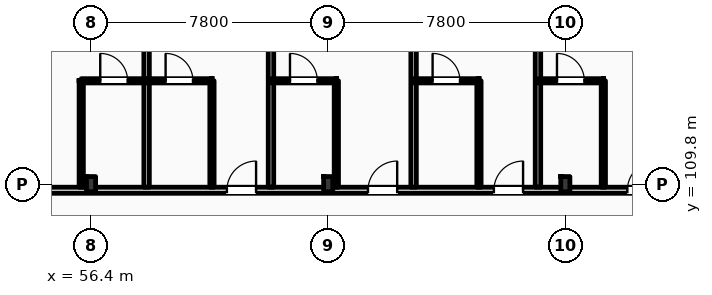
"""IFC4 building model, lengths in metres.
Left out: names, types, materials, properties, quantities, classifications, styles, units other than length and angle.
Written with IfcOpenShell. Run it as: python <this file> out.ifc"""

import sys

from ifc_helpers import new_model, si_unit, direction, frame, frame_2d, origin, origin_2d, place, context, subcontext, project, spatial, rectangle, i_section, extrude, element, fill, save


model = new_model("IFC4")
c1 = context("Model", 3, precision=1e-05, world=origin(), true_north=direction((0.0, 1.0)))
c2 = subcontext(c1, "Body", "Model", "MODEL_VIEW")
j1 = project(units=[si_unit("LENGTHUNIT", "METRE"), si_unit("PLANEANGLEUNIT", "RADIAN")], contexts=[c1])
p1 = place(None, origin())
s1 = spatial("IfcSite", under=j1, at=p1, CompositionType="ELEMENT")
p2 = place(p1, origin())
s2 = spatial("IfcBuilding", under=s1, at=p2, CompositionType="ELEMENT")
p3 = place(p2, frame((0.0, 0.0, 28.2)))
s3 = spatial("IfcBuildingStorey", under=s2, at=p3, CompositionType="ELEMENT", Elevation=28.2)
for number, where, z_axis, x_axis in (
    (1, (56.4, 109.8, 0.0), (0.0, 0.0, 1.0), (1.0, 0.0, 0.0)),
    (2, (64.2, 109.8, 0.0), (0.0, 0.0, 1.0), (1.0, 0.0, 0.0)),
    (3, (72.0, 109.8, 0.0), (0.0, 0.0, 1.0), (1.0, 0.0, 0.0)),
):
    element("IfcColumn", number, at=place(p3, frame(where, z_axis=z_axis, x_axis=x_axis)), inside=s3, PredefinedType="COLUMN", context=c2, shape_type="SweptSolid", body=[
        extrude(i_section(OverallWidth=0.3, OverallDepth=0.5, WebThickness=0.014, FlangeThickness=0.028, FilletRadius=0.027, at=origin_2d()), origin(), (0.0, 0.0, 1.0), 3.6),
    ])
p4 = place(p3, frame((10.65, 109.6, 0.0), z_axis=(0.0, 0.0, 1.0), x_axis=(1.0, 0.0, 0.0)))
e4 = element("IfcWall", 4, at=p4, inside=s3, PredefinedType="PARTITIONING", context=c2, shape_type="SweptSolid", body=[
    extrude(rectangle(XDim=109.21, YDim=0.2, at=frame_2d((54.605, 0.0))), origin(), (0.0, 0.0, 1.0), 2.8),
])
p5 = place(p4, frame((12.611, 0.0, 0.0)))
e5 = element("IfcOpeningElement", 5, at=p5, cuts=e4, PredefinedType="OPENING", context=c2, shape_type="SweptSolid", body=[
    extrude(rectangle(XDim=1.02, YDim=2.2, at=frame_2d((0.51, 1.1))), frame((0.0, 0.11, 0.0), z_axis=(0.0, -1.0, 0.0), x_axis=(1.0, 0.0, 0.0)), (0.0, 0.0, 1.0), 0.22),
])
p6 = place(p4, frame((19.451, 0.0, 0.0)))
e6 = element("IfcOpeningElement", 6, at=p6, cuts=e4, PredefinedType="OPENING", context=c2, shape_type="SweptSolid", body=[
    extrude(rectangle(XDim=1.02, YDim=2.2, at=frame_2d((0.51, 1.1))), frame((0.0, 0.11, 0.0), z_axis=(0.0, -1.0, 0.0), x_axis=(1.0, 0.0, 0.0)), (0.0, 0.0, 1.0), 0.22),
])
p7 = place(p4, frame((23.842, 0.0, 0.0)))
e7 = element("IfcOpeningElement", 7, at=p7, cuts=e4, PredefinedType="OPENING", context=c2, shape_type="SweptSolid", body=[
    extrude(rectangle(XDim=1.02, YDim=2.2, at=frame_2d((0.51, 1.1))), frame((0.0, 0.11, 0.0), z_axis=(0.0, -1.0, 0.0), x_axis=(1.0, 0.0, 0.0)), (0.0, 0.0, 1.0), 0.22),
])
p8 = place(p4, frame((26.084, 0.0, 0.0)))
e8 = element("IfcOpeningElement", 8, at=p8, cuts=e4, PredefinedType="OPENING", context=c2, shape_type="SweptSolid", body=[
    extrude(rectangle(XDim=1.02, YDim=2.2, at=frame_2d((0.51, 1.1))), frame((0.0, 0.11, 0.0), z_axis=(0.0, -1.0, 0.0), x_axis=(1.0, 0.0, 0.0)), (0.0, 0.0, 1.0), 0.22),
])
p9 = place(p4, frame((32.655, 0.0, 0.0)))
e9 = element("IfcOpeningElement", 9, at=p9, cuts=e4, PredefinedType="OPENING", context=c2, shape_type="SweptSolid", body=[
    extrude(rectangle(XDim=0.96, YDim=2.2, at=frame_2d((0.48, 1.1))), frame((0.0, 0.11, 0.0), z_axis=(0.0, -1.0, 0.0), x_axis=(1.0, 0.0, 0.0)), (0.0, 0.0, 1.0), 0.22),
])
p10 = place(p4, frame((34.895, 0.0, 0.0)))
e10 = element("IfcOpeningElement", 10, at=p10, cuts=e4, PredefinedType="OPENING", context=c2, shape_type="SweptSolid", body=[
    extrude(rectangle(XDim=0.96, YDim=2.2, at=frame_2d((0.48, 1.1))), frame((0.0, 0.11, 0.0), z_axis=(0.0, -1.0, 0.0), x_axis=(1.0, 0.0, 0.0)), (0.0, 0.0, 1.0), 0.22),
])
p11 = place(p4, frame((41.436, 0.0, 0.0)))
e11 = element("IfcOpeningElement", 11, at=p11, cuts=e4, PredefinedType="OPENING", context=c2, shape_type="SweptSolid", body=[
    extrude(rectangle(XDim=0.96, YDim=2.2, at=frame_2d((0.48, 1.1))), frame((0.0, 0.11, 0.0), z_axis=(0.0, -1.0, 0.0), x_axis=(1.0, 0.0, 0.0)), (0.0, 0.0, 1.0), 0.22),
])
p12 = place(p4, frame((43.427, 0.0, 0.0)))
e12 = element("IfcOpeningElement", 12, at=p12, cuts=e4, PredefinedType="OPENING", context=c2, shape_type="SweptSolid", body=[
    extrude(rectangle(XDim=0.96, YDim=2.2, at=frame_2d((0.48, 1.1))), frame((0.0, 0.11, 0.0), z_axis=(0.0, -1.0, 0.0), x_axis=(1.0, 0.0, 0.0)), (0.0, 0.0, 1.0), 0.22),
])
p13 = place(p4, frame((50.218, 0.0, 0.0)))
e13 = element("IfcOpeningElement", 13, at=p13, cuts=e4, PredefinedType="OPENING", context=c2, shape_type="SweptSolid", body=[
    extrude(rectangle(XDim=0.96, YDim=2.2, at=frame_2d((0.48, 1.1))), frame((0.0, 0.11, 0.0), z_axis=(0.0, -1.0, 0.0), x_axis=(1.0, 0.0, 0.0)), (0.0, 0.0, 1.0), 0.22),
])
p14 = place(p4, frame((54.859, 0.0, 0.0)))
e14 = element("IfcOpeningElement", 14, at=p14, cuts=e4, PredefinedType="OPENING", context=c2, shape_type="SweptSolid", body=[
    extrude(rectangle(XDim=0.96, YDim=2.2, at=frame_2d((0.48, 1.1))), frame((0.0, 0.11, 0.0), z_axis=(0.0, -1.0, 0.0), x_axis=(1.0, 0.0, 0.0)), (0.0, 0.0, 1.0), 0.22),
])
p15 = place(p4, frame((59.0, 0.0, 0.0)))
e15 = element("IfcOpeningElement", 15, at=p15, cuts=e4, PredefinedType="OPENING", context=c2, shape_type="SweptSolid", body=[
    extrude(rectangle(XDim=0.96, YDim=2.2, at=frame_2d((0.48, 1.1))), frame((0.0, 0.11, 0.0), z_axis=(0.0, -1.0, 0.0), x_axis=(1.0, 0.0, 0.0)), (0.0, 0.0, 1.0), 0.22),
])
p16 = place(p4, frame((63.39, 0.0, 0.0)))
e16 = element("IfcOpeningElement", 16, at=p16, cuts=e4, PredefinedType="OPENING", context=c2, shape_type="SweptSolid", body=[
    extrude(rectangle(XDim=0.96, YDim=2.2, at=frame_2d((0.48, 1.1))), frame((0.0, 0.11, 0.0), z_axis=(0.0, -1.0, 0.0), x_axis=(1.0, 0.0, 0.0)), (0.0, 0.0, 1.0), 0.22),
])
p17 = place(p4, frame((65.631, 0.0, 0.0)))
e17 = element("IfcOpeningElement", 17, at=p17, cuts=e4, PredefinedType="OPENING", context=c2, shape_type="SweptSolid", body=[
    extrude(rectangle(XDim=0.96, YDim=2.2, at=frame_2d((0.48, 1.1))), frame((0.0, 0.11, 0.0), z_axis=(0.0, -1.0, 0.0), x_axis=(1.0, 0.0, 0.0)), (0.0, 0.0, 1.0), 0.22),
])
p18 = place(p4, frame((72.172, 0.0, 0.0)))
e18 = element("IfcOpeningElement", 18, at=p18, cuts=e4, PredefinedType="OPENING", context=c2, shape_type="SweptSolid", body=[
    extrude(rectangle(XDim=0.96, YDim=2.2, at=frame_2d((0.48, 1.1))), frame((0.0, 0.11, 0.0), z_axis=(0.0, -1.0, 0.0), x_axis=(1.0, 0.0, 0.0)), (0.0, 0.0, 1.0), 0.22),
])
p19 = place(p4, frame((74.413, 0.0, 0.0)))
e19 = element("IfcOpeningElement", 19, at=p19, cuts=e4, PredefinedType="OPENING", context=c2, shape_type="SweptSolid", body=[
    extrude(rectangle(XDim=0.96, YDim=2.2, at=frame_2d((0.48, 1.1))), frame((0.0, 0.11, 0.0), z_axis=(0.0, -1.0, 0.0), x_axis=(1.0, 0.0, 0.0)), (0.0, 0.0, 1.0), 0.22),
])
p20 = place(p4, frame((80.954, 0.0, 0.0)))
e20 = element("IfcOpeningElement", 20, at=p20, cuts=e4, PredefinedType="OPENING", context=c2, shape_type="SweptSolid", body=[
    extrude(rectangle(XDim=0.96, YDim=2.2, at=frame_2d((0.48, 1.1))), frame((0.0, 0.11, 0.0), z_axis=(0.0, -1.0, 0.0), x_axis=(1.0, 0.0, 0.0)), (0.0, 0.0, 1.0), 0.22),
])
p21 = place(p4, frame((83.195, 0.0, 0.0)))
e21 = element("IfcOpeningElement", 21, at=p21, cuts=e4, PredefinedType="OPENING", context=c2, shape_type="SweptSolid", body=[
    extrude(rectangle(XDim=0.96, YDim=2.2, at=frame_2d((0.48, 1.1))), frame((0.0, 0.11, 0.0), z_axis=(0.0, -1.0, 0.0), x_axis=(1.0, 0.0, 0.0)), (0.0, 0.0, 1.0), 0.22),
])
p22 = place(p4, frame((89.735, 0.0, 0.0)))
e22 = element("IfcOpeningElement", 22, at=p22, cuts=e4, PredefinedType="OPENING", context=c2, shape_type="SweptSolid", body=[
    extrude(rectangle(XDim=0.96, YDim=2.2, at=frame_2d((0.48, 1.1))), frame((0.0, 0.11, 0.0), z_axis=(0.0, -1.0, 0.0), x_axis=(1.0, 0.0, 0.0)), (0.0, 0.0, 1.0), 0.22),
])
p23 = place(p4, frame((94.126, 0.0, 0.0)))
e23 = element("IfcOpeningElement", 23, at=p23, cuts=e4, PredefinedType="OPENING", context=c2, shape_type="SweptSolid", body=[
    extrude(rectangle(XDim=0.96, YDim=2.2, at=frame_2d((0.48, 1.1))), frame((0.0, 0.11, 0.0), z_axis=(0.0, -1.0, 0.0), x_axis=(1.0, 0.0, 0.0)), (0.0, 0.0, 1.0), 0.22),
])
p24 = place(p4, frame((98.517, 0.0, 0.0)))
e24 = element("IfcOpeningElement", 24, at=p24, cuts=e4, PredefinedType="OPENING", context=c2, shape_type="SweptSolid", body=[
    extrude(rectangle(XDim=0.96, YDim=2.2, at=frame_2d((0.48, 1.1))), frame((0.0, 0.11, 0.0), z_axis=(0.0, -1.0, 0.0), x_axis=(1.0, 0.0, 0.0)), (0.0, 0.0, 1.0), 0.22),
])
p25 = place(p4, frame((102.908, 0.0, 0.0)))
e25 = element("IfcOpeningElement", 25, at=p25, cuts=e4, PredefinedType="OPENING", context=c2, shape_type="SweptSolid", body=[
    extrude(rectangle(XDim=0.96, YDim=2.2, at=frame_2d((0.48, 1.1))), frame((0.0, 0.11, 0.0), z_axis=(0.0, -1.0, 0.0), x_axis=(1.0, 0.0, 0.0)), (0.0, 0.0, 1.0), 0.22),
])
p26 = place(p4, frame((105.099, 0.0, 0.0)))
e26 = element("IfcOpeningElement", 26, at=p26, cuts=e4, PredefinedType="OPENING", context=c2, shape_type="SweptSolid", body=[
    extrude(rectangle(XDim=0.96, YDim=2.2, at=frame_2d((0.48, 1.1))), frame((0.0, 0.11, 0.0), z_axis=(0.0, -1.0, 0.0), x_axis=(1.0, 0.0, 0.0)), (0.0, 0.0, 1.0), 0.22),
])
p27 = place(p4, frame((2.716, 0.0, 0.0)))
e27 = element("IfcOpeningElement", 27, at=p27, cuts=e4, PredefinedType="OPENING", context=c2, shape_type="SweptSolid", body=[
    extrude(rectangle(XDim=1.35, YDim=2.25, at=frame_2d((0.675, 1.125))), frame((0.0, 0.11, 0.0), z_axis=(0.0, -1.0, 0.0), x_axis=(1.0, 0.0, 0.0)), (0.0, 0.0, 1.0), 0.22),
])
p28 = place(p4, frame((6.65, 0.0, 0.0)))
e28 = element("IfcOpeningElement", 28, at=p28, cuts=e4, PredefinedType="OPENING", context=c2, shape_type="SweptSolid", body=[
    extrude(rectangle(XDim=1.35, YDim=2.25, at=frame_2d((0.675, 1.125))), frame((0.0, 0.11, 0.0), z_axis=(0.0, -1.0, 0.0), x_axis=(1.0, 0.0, 0.0)), (0.0, 0.0, 1.0), 0.22),
])
p29 = place(p4, frame((10.583, 0.0, 0.0)))
e29 = element("IfcOpeningElement", 29, at=p29, cuts=e4, PredefinedType="OPENING", context=c2, shape_type="SweptSolid", body=[
    extrude(rectangle(XDim=1.35, YDim=2.25, at=frame_2d((0.675, 1.125))), frame((0.0, 0.11, 0.0), z_axis=(0.0, -1.0, 0.0), x_axis=(1.0, 0.0, 0.0)), (0.0, 0.0, 1.0), 0.22),
])
p30 = place(p3, frame((58.227, 109.7, 0.0), z_axis=(0.0, 0.0, 1.0), x_axis=(0.0, 1.0, 0.0)))
e30 = element("IfcWall", 30, at=p30, inside=s3, PredefinedType="PARTITIONING", context=c2, shape_type="SweptSolid", body=[
    extrude(rectangle(XDim=8.15, YDim=0.18, at=frame_2d((4.075, 0.0))), origin(), (0.0, 0.0, 1.0), 3.36),
])
p31 = place(p3, frame((56.077, 109.7, 0.0), z_axis=(0.0, 0.0, 1.0), x_axis=(0.0, 1.0, 0.0)))
e31 = element("IfcWall", 31, at=p31, inside=s3, PredefinedType="PARTITIONING", context=c2, shape_type="SweptSolid", body=[
    extrude(rectangle(XDim=3.5, YDim=0.14, at=frame_2d((1.75, 0.0))), origin(), (0.0, 0.0, 1.0), 3.36),
])
p32 = place(p3, frame((56.077, 113.2, 0.0), z_axis=(0.0, 0.0, 1.0), x_axis=(1.0, 0.0, 0.0)))
e32 = element("IfcWall", 32, at=p32, inside=s3, PredefinedType="PARTITIONING", context=c2, shape_type="SweptSolid", body=[
    extrude(rectangle(XDim=2.15, YDim=0.14, at=frame_2d((1.075, 0.0))), origin(), (0.0, 0.0, 1.0), 3.36),
])
p33 = place(p32, frame((0.625, 0.0, 0.0)))
e33 = element("IfcOpeningElement", 33, at=p33, cuts=e32, PredefinedType="OPENING", context=c2, shape_type="SweptSolid", body=[
    extrude(rectangle(XDim=0.9, YDim=2.1, at=frame_2d((0.45, 1.05))), frame((0.0, 0.08, 0.0), z_axis=(0.0, -1.0, 0.0), x_axis=(1.0, 0.0, 0.0)), (0.0, 0.0, 1.0), 0.16),
])
p34 = place(p3, frame((62.318, 109.7, 0.0), z_axis=(0.0, 0.0, 1.0), x_axis=(0.0, 1.0, 0.0)))
e34 = element("IfcWall", 34, at=p34, inside=s3, PredefinedType="PARTITIONING", context=c2, shape_type="SweptSolid", body=[
    extrude(rectangle(XDim=8.15, YDim=0.18, at=frame_2d((4.075, 0.0))), origin(), (0.0, 0.0, 1.0), 3.36),
])
p35 = place(p3, frame((60.377, 109.7, 0.0), z_axis=(0.0, 0.0, 1.0), x_axis=(0.0, 1.0, 0.0)))
e35 = element("IfcWall", 35, at=p35, inside=s3, PredefinedType="PARTITIONING", context=c2, shape_type="SweptSolid", body=[
    extrude(rectangle(XDim=3.5, YDim=0.14, at=frame_2d((1.75, 0.0))), origin(), (0.0, 0.0, 1.0), 3.36),
])
p36 = place(p3, frame((58.227, 113.2, 0.0), z_axis=(0.0, 0.0, 1.0), x_axis=(1.0, 0.0, 0.0)))
e36 = element("IfcWall", 36, at=p36, inside=s3, PredefinedType="PARTITIONING", context=c2, shape_type="SweptSolid", body=[
    extrude(rectangle(XDim=2.15, YDim=0.14, at=frame_2d((1.075, 0.0))), origin(), (0.0, 0.0, 1.0), 3.36),
])
p37 = place(p36, frame((0.625, 0.0, 0.0)))
e37 = element("IfcOpeningElement", 37, at=p37, cuts=e36, PredefinedType="OPENING", context=c2, shape_type="SweptSolid", body=[
    extrude(rectangle(XDim=0.9, YDim=2.1, at=frame_2d((0.45, 1.05))), frame((0.0, 0.08, 0.0), z_axis=(0.0, -1.0, 0.0), x_axis=(1.0, 0.0, 0.0)), (0.0, 0.0, 1.0), 0.16),
])
p38 = place(p3, frame((67.009, 109.7, 0.0), z_axis=(0.0, 0.0, 1.0), x_axis=(0.0, 1.0, 0.0)))
e38 = element("IfcWall", 38, at=p38, inside=s3, PredefinedType="PARTITIONING", context=c2, shape_type="SweptSolid", body=[
    extrude(rectangle(XDim=8.15, YDim=0.18, at=frame_2d((4.075, 0.0))), origin(), (0.0, 0.0, 1.0), 3.05),
])
p39 = place(p3, frame((64.468, 109.7, 0.0), z_axis=(0.0, 0.0, 1.0), x_axis=(0.0, 1.0, 0.0)))
e39 = element("IfcWall", 39, at=p39, inside=s3, PredefinedType="PARTITIONING", context=c2, shape_type="SweptSolid", body=[
    extrude(rectangle(XDim=3.5, YDim=0.14, at=frame_2d((1.75, 0.0))), origin(), (0.0, 0.0, 1.0), 3.36),
])
p40 = place(p3, frame((62.318, 113.2, 0.0), z_axis=(0.0, 0.0, 1.0), x_axis=(1.0, 0.0, 0.0)))
e40 = element("IfcWall", 40, at=p40, inside=s3, PredefinedType="PARTITIONING", context=c2, shape_type="SweptSolid", body=[
    extrude(rectangle(XDim=2.15, YDim=0.14, at=frame_2d((1.075, 0.0))), origin(), (0.0, 0.0, 1.0), 3.36),
])
p41 = place(p40, frame((0.625, 0.0, 0.0)))
e41 = element("IfcOpeningElement", 41, at=p41, cuts=e40, PredefinedType="OPENING", context=c2, shape_type="SweptSolid", body=[
    extrude(rectangle(XDim=0.9, YDim=2.1, at=frame_2d((0.45, 1.05))), frame((0.0, 0.08, 0.0), z_axis=(0.0, -1.0, 0.0), x_axis=(1.0, 0.0, 0.0)), (0.0, 0.0, 1.0), 0.16),
])
p42 = place(p3, frame((71.1, 109.7, 0.0), z_axis=(0.0, 0.0, 1.0), x_axis=(0.0, 1.0, 0.0)))
e42 = element("IfcWall", 42, at=p42, inside=s3, PredefinedType="PARTITIONING", context=c2, shape_type="SweptSolid", body=[
    extrude(rectangle(XDim=8.15, YDim=0.18, at=frame_2d((4.075, 0.0))), origin(), (0.0, 0.0, 1.0), 3.36),
])
p43 = place(p3, frame((69.159, 109.7, 0.0), z_axis=(0.0, 0.0, 1.0), x_axis=(0.0, 1.0, 0.0)))
e43 = element("IfcWall", 43, at=p43, inside=s3, PredefinedType="PARTITIONING", context=c2, shape_type="SweptSolid", body=[
    extrude(rectangle(XDim=3.5, YDim=0.14, at=frame_2d((1.75, 0.0))), origin(), (0.0, 0.0, 1.0), 3.36),
])
p44 = place(p3, frame((67.009, 113.2, 0.0), z_axis=(0.0, 0.0, 1.0), x_axis=(1.0, 0.0, 0.0)))
e44 = element("IfcWall", 44, at=p44, inside=s3, PredefinedType="PARTITIONING", context=c2, shape_type="SweptSolid", body=[
    extrude(rectangle(XDim=2.15, YDim=0.14, at=frame_2d((1.075, 0.0))), origin(), (0.0, 0.0, 1.0), 3.36),
])
p45 = place(p44, frame((0.625, 0.0, 0.0)))
e45 = element("IfcOpeningElement", 45, at=p45, cuts=e44, PredefinedType="OPENING", context=c2, shape_type="SweptSolid", body=[
    extrude(rectangle(XDim=0.9, YDim=2.1, at=frame_2d((0.45, 1.05))), frame((0.0, 0.08, 0.0), z_axis=(0.0, -1.0, 0.0), x_axis=(1.0, 0.0, 0.0)), (0.0, 0.0, 1.0), 0.16),
])
p46 = place(p3, frame((73.25, 109.7, 0.0), z_axis=(0.0, 0.0, 1.0), x_axis=(0.0, 1.0, 0.0)))
e46 = element("IfcWall", 46, at=p46, inside=s3, PredefinedType="PARTITIONING", context=c2, shape_type="SweptSolid", body=[
    extrude(rectangle(XDim=3.5, YDim=0.14, at=frame_2d((1.75, 0.0))), origin(), (0.0, 0.0, 1.0), 3.36),
])
p47 = place(p3, frame((71.1, 113.2, 0.0), z_axis=(0.0, 0.0, 1.0), x_axis=(1.0, 0.0, 0.0)))
e47 = element("IfcWall", 47, at=p47, inside=s3, PredefinedType="PARTITIONING", context=c2, shape_type="SweptSolid", body=[
    extrude(rectangle(XDim=2.15, YDim=0.14, at=frame_2d((1.075, 0.0))), origin(), (0.0, 0.0, 1.0), 3.36),
])
p48 = place(p47, frame((0.625, 0.0, 0.0)))
e48 = element("IfcOpeningElement", 48, at=p48, cuts=e47, PredefinedType="OPENING", context=c2, shape_type="SweptSolid", body=[
    extrude(rectangle(XDim=0.9, YDim=2.1, at=frame_2d((0.45, 1.05))), frame((0.0, 0.08, 0.0), z_axis=(0.0, -1.0, 0.0), x_axis=(1.0, 0.0, 0.0)), (0.0, 0.0, 1.0), 0.16),
])
p49 = place(p33, origin())
e49 = element("IfcDoor", 49, at=p49, inside=s3, OperationType="SINGLE_SWING_LEFT", PredefinedType="DOOR", context=c2, shape_type="SweptSolid", body=[
    extrude(rectangle(XDim=0.9, YDim=2.1, at=frame_2d((0.45, 1.05))), frame((0.0, 0.025, 0.0), z_axis=(0.0, -1.0, 0.0), x_axis=(1.0, 0.0, 0.0)), (0.0, 0.0, 1.0), 0.05),
])
fill(e33, e49)
p50 = place(p13, origin())
e50 = element("IfcDoor", 50, at=p50, inside=s3, OperationType="SINGLE_SWING_RIGHT", PredefinedType="DOOR", context=c2, shape_type="SweptSolid", body=[
    extrude(rectangle(XDim=0.96, YDim=2.2, at=frame_2d((0.48, 1.1))), frame((0.0, 0.025, 0.0), z_axis=(0.0, -1.0, 0.0), x_axis=(1.0, 0.0, 0.0)), (0.0, 0.0, 1.0), 0.05),
])
fill(e13, e50)
p51 = place(p37, origin())
e51 = element("IfcDoor", 51, at=p51, inside=s3, OperationType="SINGLE_SWING_LEFT", PredefinedType="DOOR", context=c2, shape_type="SweptSolid", body=[
    extrude(rectangle(XDim=0.9, YDim=2.1, at=frame_2d((0.45, 1.05))), frame((0.0, 0.025, 0.0), z_axis=(0.0, -1.0, 0.0), x_axis=(1.0, 0.0, 0.0)), (0.0, 0.0, 1.0), 0.05),
])
fill(e37, e51)
p52 = place(p14, origin())
e52 = element("IfcDoor", 52, at=p52, inside=s3, OperationType="SINGLE_SWING_RIGHT", PredefinedType="DOOR", context=c2, shape_type="SweptSolid", body=[
    extrude(rectangle(XDim=0.96, YDim=2.2, at=frame_2d((0.48, 1.1))), frame((0.0, 0.025, 0.0), z_axis=(0.0, -1.0, 0.0), x_axis=(1.0, 0.0, 0.0)), (0.0, 0.0, 1.0), 0.05),
])
fill(e14, e52)
p53 = place(p41, origin())
e53 = element("IfcDoor", 53, at=p53, inside=s3, OperationType="SINGLE_SWING_LEFT", PredefinedType="DOOR", context=c2, shape_type="SweptSolid", body=[
    extrude(rectangle(XDim=0.9, YDim=2.1, at=frame_2d((0.45, 1.05))), frame((0.0, 0.025, 0.0), z_axis=(0.0, -1.0, 0.0), x_axis=(1.0, 0.0, 0.0)), (0.0, 0.0, 1.0), 0.05),
])
fill(e41, e53)
p54 = place(p15, origin())
e54 = element("IfcDoor", 54, at=p54, inside=s3, OperationType="SINGLE_SWING_RIGHT", PredefinedType="DOOR", context=c2, shape_type="SweptSolid", body=[
    extrude(rectangle(XDim=0.96, YDim=2.2, at=frame_2d((0.48, 1.1))), frame((0.0, 0.025, 0.0), z_axis=(0.0, -1.0, 0.0), x_axis=(1.0, 0.0, 0.0)), (0.0, 0.0, 1.0), 0.05),
])
fill(e15, e54)
p55 = place(p45, origin())
e55 = element("IfcDoor", 55, at=p55, inside=s3, OperationType="SINGLE_SWING_LEFT", PredefinedType="DOOR", context=c2, shape_type="SweptSolid", body=[
    extrude(rectangle(XDim=0.9, YDim=2.1, at=frame_2d((0.45, 1.05))), frame((0.0, 0.025, 0.0), z_axis=(0.0, -1.0, 0.0), x_axis=(1.0, 0.0, 0.0)), (0.0, 0.0, 1.0), 0.05),
])
fill(e45, e55)
p56 = place(p16, origin())
e56 = element("IfcDoor", 56, at=p56, inside=s3, OperationType="SINGLE_SWING_RIGHT", PredefinedType="DOOR", context=c2, shape_type="SweptSolid", body=[
    extrude(rectangle(XDim=0.96, YDim=2.2, at=frame_2d((0.48, 1.1))), frame((0.0, 0.025, 0.0), z_axis=(0.0, -1.0, 0.0), x_axis=(1.0, 0.0, 0.0)), (0.0, 0.0, 1.0), 0.05),
])
fill(e16, e56)
p57 = place(p48, origin())
e57 = element("IfcDoor", 57, at=p57, inside=s3, OperationType="SINGLE_SWING_LEFT", PredefinedType="DOOR", context=c2, shape_type="SweptSolid", body=[
    extrude(rectangle(XDim=0.9, YDim=2.1, at=frame_2d((0.45, 1.05))), frame((0.0, 0.025, 0.0), z_axis=(0.0, -1.0, 0.0), x_axis=(1.0, 0.0, 0.0)), (0.0, 0.0, 1.0), 0.05),
])
fill(e48, e57)
save(model, sys.argv[1])
